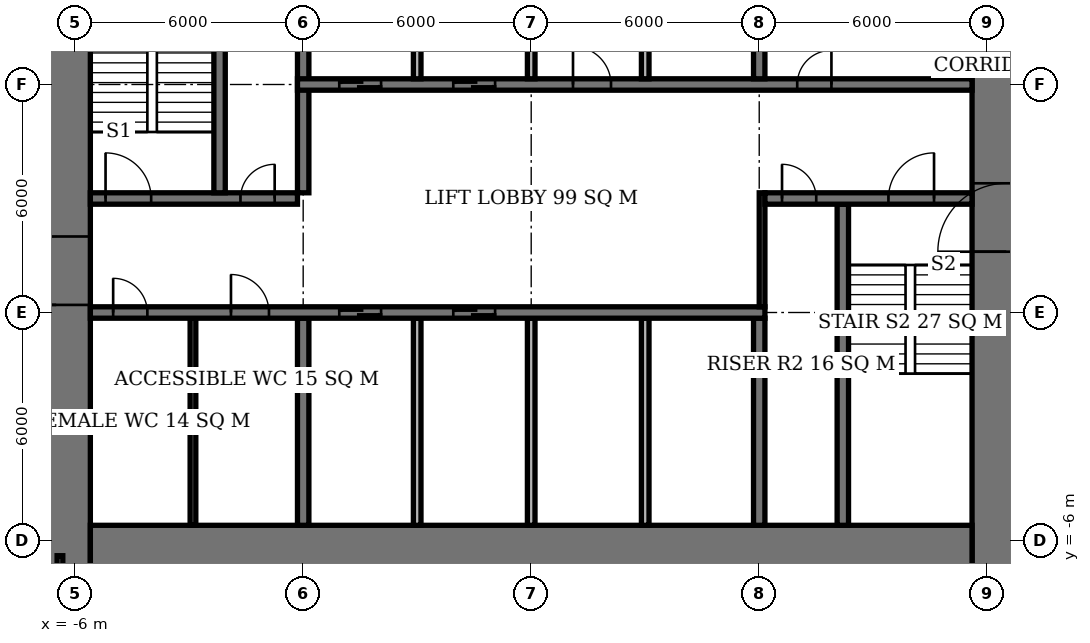
"""IFC4 building model, lengths in metres.
Left out: names, types, materials, properties, quantities, classifications, styles, units other than length and angle.
Written with IfcOpenShell. Run it as: python <this file> out.ifc"""

import sys

from ifc_helpers import new_model, si_unit, direction, frame, frame_2d, origin, place, context, subcontext, project, spatial, rectangle, extrude, element, fill, save


model = new_model("IFC4")
c1 = context("Model", 3, precision=1e-05, world=origin(), true_north=direction((0.0, 1.0)))
c2 = subcontext(c1, "Body", "Model", "MODEL_VIEW")
j1 = project(units=[si_unit("LENGTHUNIT", "METRE"), si_unit("PLANEANGLEUNIT", "RADIAN")], contexts=[c1])
p1 = place(None, origin())
s1 = spatial("IfcSite", under=j1, at=p1, CompositionType="ELEMENT")
p2 = place(p1, origin())
s2 = spatial("IfcBuilding", under=s1, at=p2, CompositionType="ELEMENT")
p3 = place(p2, frame((0.0, 0.0, 156.2)))
s3 = spatial("IfcBuildingStorey", under=s2, at=p3, CompositionType="ELEMENT", Elevation=156.2)
p4 = place(p3, frame((-5.6, -6.6, 0.0), z_axis=(0.0, 0.0, 1.0), x_axis=(1.0, 0.0, 0.0)))
e1 = element("IfcWall", 1, at=p4, inside=s3, PredefinedType="SHEAR", context=c2, shape_type="SweptSolid", body=[
    extrude(rectangle(XDim=23.2, YDim=2.0, at=frame_2d((11.6, 0.0))), origin(), (0.0, 0.0, 1.0), 3.9),
])
p5 = place(p3, frame((-6.5, -7.6, 0.0), z_axis=(0.0, 0.0, 1.0), x_axis=(0.0, 1.0, 0.0)))
e2 = element("IfcWall", 2, at=p5, inside=s3, PredefinedType="SHEAR", context=c2, shape_type="SweptSolid", body=[
    extrude(rectangle(XDim=21.2, YDim=1.8, at=frame_2d((10.6, 0.0))), origin(), (0.0, 0.0, 1.0), 3.9),
])
p6 = place(p5, frame((7.8, 0.0, 0.0)))
e3 = element("IfcOpeningElement", 3, at=p6, cuts=e2, PredefinedType="OPENING", context=c2, shape_type="SweptSolid", body=[
    extrude(rectangle(XDim=1.8, YDim=2.4, at=frame_2d((0.9, 1.2))), frame((0.0, 0.91, 0.0), z_axis=(0.0, -1.0, 0.0), x_axis=(1.0, 0.0, 0.0)), (0.0, 0.0, 1.0), 1.82),
])
p7 = place(p3, frame((18.5, -7.6, 0.0), z_axis=(0.0, 0.0, 1.0), x_axis=(0.0, 1.0, 0.0)))
e4 = element("IfcWall", 4, at=p7, inside=s3, PredefinedType="SHEAR", context=c2, shape_type="SweptSolid", body=[
    extrude(rectangle(XDim=21.2, YDim=1.8, at=frame_2d((10.6, 0.0))), origin(), (0.0, 0.0, 1.0), 3.9),
])
p8 = place(p7, frame((9.2, 0.0, 0.0)))
e5 = element("IfcOpeningElement", 5, at=p8, cuts=e4, PredefinedType="OPENING", context=c2, shape_type="SweptSolid", body=[
    extrude(rectangle(XDim=1.8, YDim=2.4, at=frame_2d((0.9, 1.2))), frame((0.0, 0.91, 0.0), z_axis=(0.0, -1.0, 0.0), x_axis=(1.0, 0.0, 0.0)), (0.0, 0.0, 1.0), 1.82),
])
p9 = place(p3, frame((-5.6, 0.0, 0.0), z_axis=(0.0, 0.0, 1.0), x_axis=(1.0, 0.0, 0.0)))
e6 = element("IfcWall", 6, at=p9, inside=s3, PredefinedType="SHEAR", context=c2, shape_type="SweptSolid", body=[
    extrude(rectangle(XDim=17.75, YDim=0.3, at=frame_2d((8.875, 0.0))), origin(), (0.0, 0.0, 1.0), 3.9),
])
p10 = place(p9, frame((0.6, 0.0, 0.0)))
e7 = element("IfcOpeningElement", 7, at=p10, cuts=e6, PredefinedType="OPENING", context=c2, shape_type="SweptSolid", body=[
    extrude(rectangle(XDim=0.9, YDim=2.1, at=frame_2d((0.45, 1.05))), frame((0.0, 0.16, 0.0), z_axis=(0.0, -1.0, 0.0), x_axis=(1.0, 0.0, 0.0)), (0.0, 0.0, 1.0), 0.32),
])
p11 = place(p9, frame((3.7, 0.0, 0.0)))
e8 = element("IfcOpeningElement", 8, at=p11, cuts=e6, PredefinedType="OPENING", context=c2, shape_type="SweptSolid", body=[
    extrude(rectangle(XDim=1.0, YDim=2.1, at=frame_2d((0.5, 1.05))), frame((0.0, 0.16, 0.0), z_axis=(0.0, -1.0, 0.0), x_axis=(1.0, 0.0, 0.0)), (0.0, 0.0, 1.0), 0.32),
])
p12 = place(p9, frame((6.55, 0.0, 0.0)))
e9 = element("IfcOpeningElement", 9, at=p12, cuts=e6, PredefinedType="OPENING", context=c2, shape_type="SweptSolid", body=[
    extrude(rectangle(XDim=1.1, YDim=2.1, at=frame_2d((0.55, 1.05))), frame((0.0, 0.16, 0.0), z_axis=(0.0, -1.0, 0.0), x_axis=(1.0, 0.0, 0.0)), (0.0, 0.0, 1.0), 0.32),
])
p13 = place(p9, frame((9.55, 0.0, 0.0)))
e10 = element("IfcOpeningElement", 10, at=p13, cuts=e6, PredefinedType="OPENING", context=c2, shape_type="SweptSolid", body=[
    extrude(rectangle(XDim=1.1, YDim=2.1, at=frame_2d((0.55, 1.05))), frame((0.0, 0.16, 0.0), z_axis=(0.0, -1.0, 0.0), x_axis=(1.0, 0.0, 0.0)), (0.0, 0.0, 1.0), 0.32),
])
p14 = place(p3, frame((-5.6, 3.0, 0.0), z_axis=(0.0, 0.0, 1.0), x_axis=(1.0, 0.0, 0.0)))
e11 = element("IfcWall", 11, at=p14, inside=s3, PredefinedType="SHEAR", context=c2, shape_type="SweptSolid", body=[
    extrude(rectangle(XDim=5.45, YDim=0.3, at=frame_2d((2.725, 0.0))), origin(), (0.0, 0.0, 1.0), 3.9),
])
p15 = place(p14, frame((0.4, 0.0, 0.0)))
e12 = element("IfcOpeningElement", 12, at=p15, cuts=e11, PredefinedType="OPENING", context=c2, shape_type="SweptSolid", body=[
    extrude(rectangle(XDim=1.2, YDim=2.1, at=frame_2d((0.6, 1.05))), frame((0.0, 0.16, 0.0), z_axis=(0.0, -1.0, 0.0), x_axis=(1.0, 0.0, 0.0)), (0.0, 0.0, 1.0), 0.32),
])
p16 = place(p14, frame((3.95, 0.0, 0.0)))
e13 = element("IfcOpeningElement", 13, at=p16, cuts=e11, PredefinedType="OPENING", context=c2, shape_type="SweptSolid", body=[
    extrude(rectangle(XDim=0.9, YDim=2.1, at=frame_2d((0.45, 1.05))), frame((0.0, 0.16, 0.0), z_axis=(0.0, -1.0, 0.0), x_axis=(1.0, 0.0, 0.0)), (0.0, 0.0, 1.0), 0.32),
])
p17 = place(p3, frame((12.15, 3.0, 0.0), z_axis=(0.0, 0.0, 1.0), x_axis=(1.0, 0.0, 0.0)))
e14 = element("IfcWall", 14, at=p17, inside=s3, PredefinedType="SHEAR", context=c2, shape_type="SweptSolid", body=[
    extrude(rectangle(XDim=5.45, YDim=0.3, at=frame_2d((2.725, 0.0))), origin(), (0.0, 0.0, 1.0), 3.9),
])
p18 = place(p17, frame((3.25, 0.0, 0.0)))
e15 = element("IfcOpeningElement", 15, at=p18, cuts=e14, PredefinedType="OPENING", context=c2, shape_type="SweptSolid", body=[
    extrude(rectangle(XDim=1.2, YDim=2.1, at=frame_2d((0.6, 1.05))), frame((0.0, 0.16, 0.0), z_axis=(0.0, -1.0, 0.0), x_axis=(1.0, 0.0, 0.0)), (0.0, 0.0, 1.0), 0.32),
])
p19 = place(p17, frame((0.45, 0.0, 0.0)))
e16 = element("IfcOpeningElement", 16, at=p19, cuts=e14, PredefinedType="OPENING", context=c2, shape_type="SweptSolid", body=[
    extrude(rectangle(XDim=0.9, YDim=2.1, at=frame_2d((0.45, 1.05))), frame((0.0, 0.16, 0.0), z_axis=(0.0, -1.0, 0.0), x_axis=(1.0, 0.0, 0.0)), (0.0, 0.0, 1.0), 0.32),
])
p20 = place(p3, frame((-0.15, 6.0, 0.0), z_axis=(0.0, 0.0, 1.0), x_axis=(1.0, 0.0, 0.0)))
e17 = element("IfcWall", 17, at=p20, inside=s3, PredefinedType="SHEAR", context=c2, shape_type="SweptSolid", body=[
    extrude(rectangle(XDim=17.75, YDim=0.3, at=frame_2d((8.875, 0.0))), origin(), (0.0, 0.0, 1.0), 3.9),
])
p21 = place(p20, frame((13.15, 0.0, 0.0)))
e18 = element("IfcOpeningElement", 18, at=p21, cuts=e17, PredefinedType="OPENING", context=c2, shape_type="SweptSolid", body=[
    extrude(rectangle(XDim=0.9, YDim=2.1, at=frame_2d((0.45, 1.05))), frame((0.0, 0.16, 0.0), z_axis=(0.0, -1.0, 0.0), x_axis=(1.0, 0.0, 0.0)), (0.0, 0.0, 1.0), 0.32),
])
p22 = place(p20, frame((7.25, 0.0, 0.0)))
e19 = element("IfcOpeningElement", 19, at=p22, cuts=e17, PredefinedType="OPENING", context=c2, shape_type="SweptSolid", body=[
    extrude(rectangle(XDim=1.0, YDim=2.1, at=frame_2d((0.5, 1.05))), frame((0.0, 0.16, 0.0), z_axis=(0.0, -1.0, 0.0), x_axis=(1.0, 0.0, 0.0)), (0.0, 0.0, 1.0), 0.32),
])
p23 = place(p20, frame((1.1, 0.0, 0.0)))
e20 = element("IfcOpeningElement", 20, at=p23, cuts=e17, PredefinedType="OPENING", context=c2, shape_type="SweptSolid", body=[
    extrude(rectangle(XDim=1.1, YDim=2.1, at=frame_2d((0.55, 1.05))), frame((0.0, 0.16, 0.0), z_axis=(0.0, -1.0, 0.0), x_axis=(1.0, 0.0, 0.0)), (0.0, 0.0, 1.0), 0.32),
])
p24 = place(p20, frame((4.1, 0.0, 0.0)))
e21 = element("IfcOpeningElement", 21, at=p24, cuts=e17, PredefinedType="OPENING", context=c2, shape_type="SweptSolid", body=[
    extrude(rectangle(XDim=1.1, YDim=2.1, at=frame_2d((0.55, 1.05))), frame((0.0, 0.16, 0.0), z_axis=(0.0, -1.0, 0.0), x_axis=(1.0, 0.0, 0.0)), (0.0, 0.0, 1.0), 0.32),
])
p25 = place(p3, frame((0.0, -5.6, 0.0), z_axis=(0.0, 0.0, 1.0), x_axis=(0.0, 1.0, 0.0)))
e22 = element("IfcWall", 22, at=p25, inside=s3, PredefinedType="SHEAR", context=c2, shape_type="SweptSolid", body=[
    extrude(rectangle(XDim=5.45, YDim=0.3, at=frame_2d((2.725, 0.0))), origin(), (0.0, 0.0, 1.0), 3.9),
])
p26 = place(p3, frame((0.0, 3.15, 0.0), z_axis=(0.0, 0.0, 1.0), x_axis=(0.0, 1.0, 0.0)))
e23 = element("IfcWall", 23, at=p26, inside=s3, PredefinedType="SHEAR", context=c2, shape_type="SweptSolid", body=[
    extrude(rectangle(XDim=8.45, YDim=0.3, at=frame_2d((4.225, 0.0))), origin(), (0.0, 0.0, 1.0), 3.9),
])
for number, where, z_axis, x_axis in (
    (24, (12.0, -5.6, 0.0), (0.0, 0.0, 1.0), (0.0, 1.0, 0.0)),
    (25, (12.0, 6.15, 0.0), (0.0, 0.0, 1.0), (0.0, 1.0, 0.0)),
):
    element("IfcWall", number, at=place(p3, frame(where, z_axis=z_axis, x_axis=x_axis)), inside=s3, PredefinedType="SHEAR", context=c2, shape_type="SweptSolid", body=[
        extrude(rectangle(XDim=5.45, YDim=0.3, at=frame_2d((2.725, 0.0))), origin(), (0.0, 0.0, 1.0), 3.9),
    ])
for number, where, z_axis, x_axis in (
    (26, (-2.2, 3.15, 0.0), (0.0, 0.0, 1.0), (0.0, 1.0, 0.0)),
    (27, (14.2, -5.6, 0.0), (0.0, 0.0, 1.0), (0.0, 1.0, 0.0)),
):
    element("IfcWall", number, at=place(p3, frame(where, z_axis=z_axis, x_axis=x_axis)), inside=s3, PredefinedType="SHEAR", context=c2, shape_type="SweptSolid", body=[
        extrude(rectangle(XDim=8.45, YDim=0.3, at=frame_2d((4.225, 0.0))), origin(), (0.0, 0.0, 1.0), 3.9),
    ])
for number, where, z_axis, x_axis in (
    (28, (3.0, 6.15, 0.0), (0.0, 0.0, 1.0), (0.0, 1.0, 0.0)),
    (29, (6.0, 6.15, 0.0), (0.0, 0.0, 1.0), (0.0, 1.0, 0.0)),
    (30, (9.0, 6.15, 0.0), (0.0, 0.0, 1.0), (0.0, 1.0, 0.0)),
    (31, (3.0, -5.6, 0.0), (0.0, 0.0, 1.0), (0.0, 1.0, 0.0)),
    (32, (6.0, -5.6, 0.0), (0.0, 0.0, 1.0), (0.0, 1.0, 0.0)),
    (33, (9.0, -5.6, 0.0), (0.0, 0.0, 1.0), (0.0, 1.0, 0.0)),
):
    element("IfcWall", number, at=place(p3, frame(where, z_axis=z_axis, x_axis=x_axis)), inside=s3, PredefinedType="SOLIDWALL", context=c2, shape_type="SweptSolid", body=[
        extrude(rectangle(XDim=5.45, YDim=0.2, at=frame_2d((2.725, 0.0))), origin(), (0.0, 0.0, 1.0), 3.9),
    ])
p27 = place(p3, frame((-2.9, -5.6, 0.0), z_axis=(0.0, 0.0, 1.0), x_axis=(0.0, 1.0, 0.0)))
e34 = element("IfcWall", 34, at=p27, inside=s3, PredefinedType="PLUMBINGWALL", context=c2, shape_type="SweptSolid", body=[
    extrude(rectangle(XDim=5.45, YDim=0.15, at=frame_2d((2.725, 0.0))), origin(), (0.0, 0.0, 1.0), 3.65),
])
for number, where, z_axis, x_axis in (
    (35, (-6.4, -7.6, 0.0), (0.0, 0.0, 1.0), (0.0, 1.0, 0.0)),
    (36, (18.4, -7.6, 0.0), (0.0, 0.0, 1.0), (0.0, 1.0, 0.0)),
):
    element("IfcWall", number, at=place(p3, frame(where, z_axis=z_axis, x_axis=x_axis)), inside=s3, PredefinedType="PARTITIONING", context=c2, shape_type="SweptSolid", body=[
        extrude(rectangle(XDim=1.2, YDim=0.15, at=frame_2d((0.6, 0.0))), origin(), (0.0, 0.0, 1.0), 3.65),
    ])
p28 = place(p3, frame((12.075, 0.15, 0.0), z_axis=(0.0, 0.0, 1.0), x_axis=(0.0, 1.0, 0.0)))
e37 = element("IfcWall", 37, at=p28, inside=s3, PredefinedType="PARTITIONING", context=c2, shape_type="SweptSolid", body=[
    extrude(rectangle(XDim=3.0, YDim=0.15, at=frame_2d((1.5, 0.0))), origin(), (0.0, 0.0, 1.0), 3.65),
])
p29 = place(p6, origin())
e38 = element("IfcDoor", 38, at=p29, inside=s3, OperationType="DOUBLE_DOOR_SINGLE_SWING", PredefinedType="DOOR", context=c2, shape_type="SweptSolid", body=[
    extrude(rectangle(XDim=1.8, YDim=2.4, at=frame_2d((0.9, 1.2))), frame((0.0, 0.025, 0.0), z_axis=(0.0, -1.0, 0.0), x_axis=(1.0, 0.0, 0.0)), (0.0, 0.0, 1.0), 0.05),
])
fill(e3, e38)
p30 = place(p8, origin())
e39 = element("IfcDoor", 39, at=p30, inside=s3, OperationType="DOUBLE_DOOR_SINGLE_SWING", PredefinedType="DOOR", context=c2, shape_type="SweptSolid", body=[
    extrude(rectangle(XDim=1.8, YDim=2.4, at=frame_2d((0.9, 1.2))), frame((0.0, 0.025, 0.0), z_axis=(0.0, -1.0, 0.0), x_axis=(1.0, 0.0, 0.0)), (0.0, 0.0, 1.0), 0.05),
])
fill(e5, e39)
p31 = place(p15, origin())
e40 = element("IfcDoor", 40, at=p31, inside=s3, OperationType="SINGLE_SWING_LEFT", PredefinedType="DOOR", context=c2, shape_type="SweptSolid", body=[
    extrude(rectangle(XDim=1.2, YDim=2.1, at=frame_2d((0.6, 1.05))), frame((0.0, 0.025, 0.0), z_axis=(0.0, -1.0, 0.0), x_axis=(1.0, 0.0, 0.0)), (0.0, 0.0, 1.0), 0.05),
])
fill(e12, e40)
p32 = place(p16, origin())
e41 = element("IfcDoor", 41, at=p32, inside=s3, OperationType="SINGLE_SWING_RIGHT", PredefinedType="DOOR", context=c2, shape_type="SweptSolid", body=[
    extrude(rectangle(XDim=0.9, YDim=2.1, at=frame_2d((0.45, 1.05))), frame((0.0, 0.025, 0.0), z_axis=(0.0, -1.0, 0.0), x_axis=(1.0, 0.0, 0.0)), (0.0, 0.0, 1.0), 0.05),
])
fill(e13, e41)
p33 = place(p18, origin())
e42 = element("IfcDoor", 42, at=p33, inside=s3, OperationType="SINGLE_SWING_RIGHT", PredefinedType="DOOR", context=c2, shape_type="SweptSolid", body=[
    extrude(rectangle(XDim=1.2, YDim=2.1, at=frame_2d((0.6, 1.05))), frame((0.0, 0.025, 0.0), z_axis=(0.0, -1.0, 0.0), x_axis=(1.0, 0.0, 0.0)), (0.0, 0.0, 1.0), 0.05),
])
fill(e15, e42)
p34 = place(p19, origin())
e43 = element("IfcDoor", 43, at=p34, inside=s3, OperationType="SINGLE_SWING_LEFT", PredefinedType="DOOR", context=c2, shape_type="SweptSolid", body=[
    extrude(rectangle(XDim=0.9, YDim=2.1, at=frame_2d((0.45, 1.05))), frame((0.0, 0.025, 0.0), z_axis=(0.0, -1.0, 0.0), x_axis=(1.0, 0.0, 0.0)), (0.0, 0.0, 1.0), 0.05),
])
fill(e16, e43)
p35 = place(p10, origin())
e44 = element("IfcDoor", 44, at=p35, inside=s3, OperationType="SINGLE_SWING_LEFT", PredefinedType="DOOR", context=c2, shape_type="SweptSolid", body=[
    extrude(rectangle(XDim=0.9, YDim=2.1, at=frame_2d((0.45, 1.05))), frame((0.0, 0.025, 0.0), z_axis=(0.0, -1.0, 0.0), x_axis=(1.0, 0.0, 0.0)), (0.0, 0.0, 1.0), 0.05),
])
fill(e7, e44)
p36 = place(p11, origin())
e45 = element("IfcDoor", 45, at=p36, inside=s3, OperationType="SINGLE_SWING_LEFT", PredefinedType="DOOR", context=c2, shape_type="SweptSolid", body=[
    extrude(rectangle(XDim=1.0, YDim=2.1, at=frame_2d((0.5, 1.05))), frame((0.0, 0.025, 0.0), z_axis=(0.0, -1.0, 0.0), x_axis=(1.0, 0.0, 0.0)), (0.0, 0.0, 1.0), 0.05),
])
fill(e8, e45)
p37 = place(p21, origin())
e46 = element("IfcDoor", 46, at=p37, inside=s3, OperationType="SINGLE_SWING_RIGHT", PredefinedType="DOOR", context=c2, shape_type="SweptSolid", body=[
    extrude(rectangle(XDim=0.9, YDim=2.1, at=frame_2d((0.45, 1.05))), frame((0.0, 0.025, 0.0), z_axis=(0.0, -1.0, 0.0), x_axis=(1.0, 0.0, 0.0)), (0.0, 0.0, 1.0), 0.05),
])
fill(e18, e46)
p38 = place(p22, origin())
e47 = element("IfcDoor", 47, at=p38, inside=s3, OperationType="SINGLE_SWING_LEFT", PredefinedType="DOOR", context=c2, shape_type="SweptSolid", body=[
    extrude(rectangle(XDim=1.0, YDim=2.1, at=frame_2d((0.5, 1.05))), frame((0.0, 0.025, 0.0), z_axis=(0.0, -1.0, 0.0), x_axis=(1.0, 0.0, 0.0)), (0.0, 0.0, 1.0), 0.05),
])
fill(e19, e47)
p39 = place(p23, origin())
e48 = element("IfcDoor", 48, at=p39, inside=s3, OperationType="DOUBLE_DOOR_SLIDING", PredefinedType="USERDEFINED", context=c2, shape_type="SweptSolid", body=[
    extrude(rectangle(XDim=1.1, YDim=2.1, at=frame_2d((0.55, 1.05))), frame((0.0, 0.025, 0.0), z_axis=(0.0, -1.0, 0.0), x_axis=(1.0, 0.0, 0.0)), (0.0, 0.0, 1.0), 0.05),
])
fill(e20, e48)
p40 = place(p24, origin())
e49 = element("IfcDoor", 49, at=p40, inside=s3, OperationType="DOUBLE_DOOR_SLIDING", PredefinedType="USERDEFINED", context=c2, shape_type="SweptSolid", body=[
    extrude(rectangle(XDim=1.1, YDim=2.1, at=frame_2d((0.55, 1.05))), frame((0.0, 0.025, 0.0), z_axis=(0.0, -1.0, 0.0), x_axis=(1.0, 0.0, 0.0)), (0.0, 0.0, 1.0), 0.05),
])
fill(e21, e49)
p41 = place(p12, origin())
e50 = element("IfcDoor", 50, at=p41, inside=s3, OperationType="DOUBLE_DOOR_SLIDING", PredefinedType="USERDEFINED", context=c2, shape_type="SweptSolid", body=[
    extrude(rectangle(XDim=1.1, YDim=2.1, at=frame_2d((0.55, 1.05))), frame((0.0, 0.025, 0.0), z_axis=(0.0, -1.0, 0.0), x_axis=(1.0, 0.0, 0.0)), (0.0, 0.0, 1.0), 0.05),
])
fill(e9, e50)
p42 = place(p13, origin())
e51 = element("IfcDoor", 51, at=p42, inside=s3, OperationType="DOUBLE_DOOR_SLIDING", PredefinedType="USERDEFINED", context=c2, shape_type="SweptSolid", body=[
    extrude(rectangle(XDim=1.1, YDim=2.1, at=frame_2d((0.55, 1.05))), frame((0.0, 0.025, 0.0), z_axis=(0.0, -1.0, 0.0), x_axis=(1.0, 0.0, 0.0)), (0.0, 0.0, 1.0), 0.05),
])
fill(e10, e51)
save(model, sys.argv[1])
